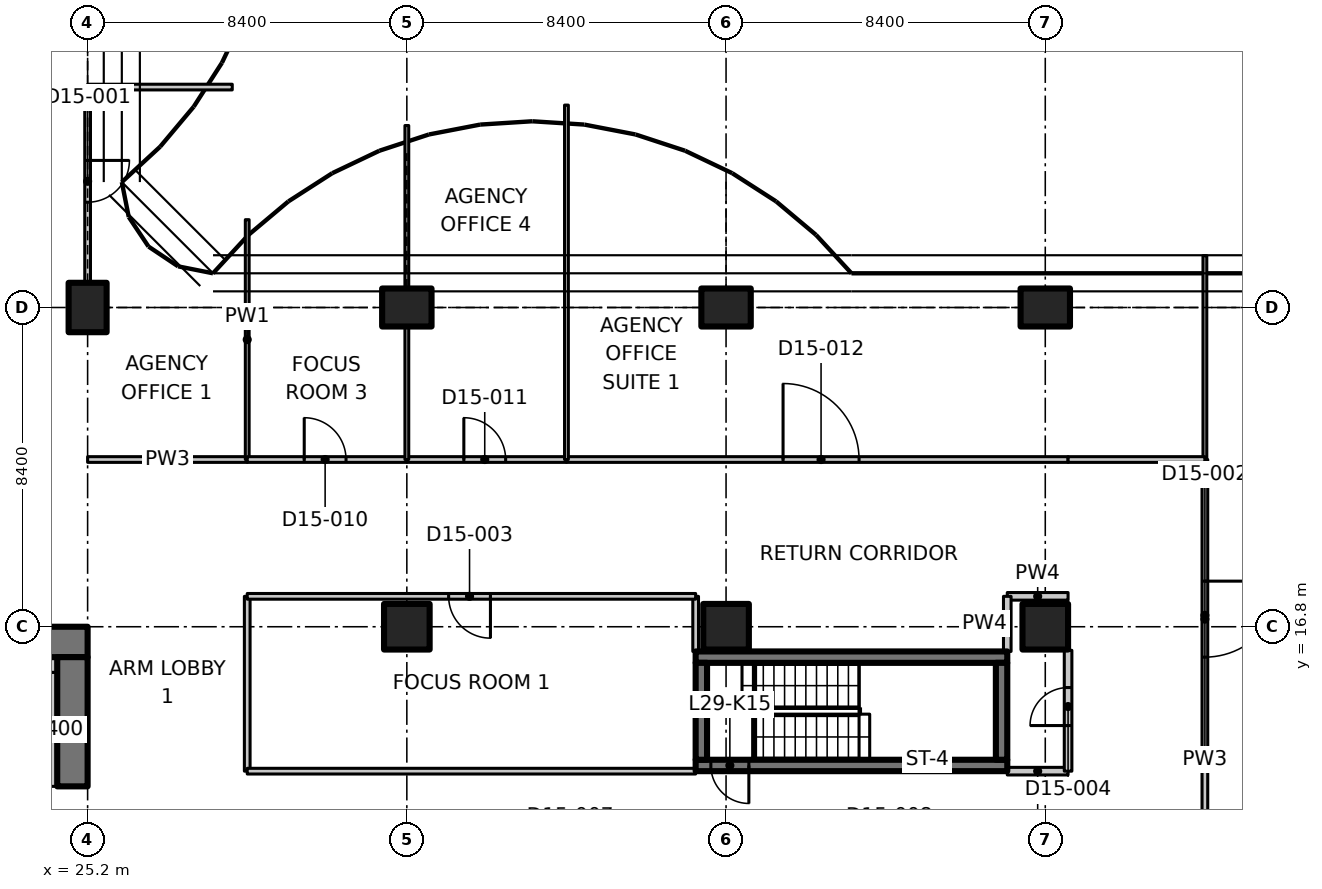
"""IFC4 building model, lengths in metres.
Left out: names, types, materials, properties, quantities, classifications, styles, units other than length and angle.
Written with IfcOpenShell. Run it as: python <this file> out.ifc"""

import sys

from ifc_helpers import new_model, si_unit, direction, frame, frame_2d, origin, origin_2d, place, context, subcontext, project, spatial, polyline, rectangle, outline, extrude, element, fill, save


model = new_model("IFC4")
c1 = context("Model", 3, precision=1e-05, world=origin(), true_north=direction((0.0, 1.0)))
c2 = subcontext(c1, "Body", "Model", "MODEL_VIEW")
j1 = project(units=[si_unit("LENGTHUNIT", "METRE"), si_unit("PLANEANGLEUNIT", "RADIAN")], contexts=[c1])
p1 = place(None, origin())
s1 = spatial("IfcSite", under=j1, at=p1, CompositionType="ELEMENT")
p2 = place(p1, origin())
s2 = spatial("IfcBuilding", under=s1, at=p2, CompositionType="ELEMENT")
p3 = place(p2, frame((0.0, 0.0, 120.5)))
s3 = spatial("IfcBuildingStorey", under=s2, at=p3, CompositionType="ELEMENT", Elevation=120.5)
p4 = place(p3, frame((25.2, 25.2, 0.0), z_axis=(0.0, 0.0, 1.0), x_axis=(1.0, 0.0, 0.0)))
e1 = element("IfcColumn", 1, at=p4, inside=s3, PredefinedType="COLUMN", context=c2, shape_type="SweptSolid", body=[
    extrude(rectangle(XDim=1.0, YDim=1.3, at=origin_2d()), origin(), (0.0, 0.0, 1.0), 3.35),
])
p5 = place(p3, frame((33.6, 16.8, 0.0), z_axis=(0.0, 0.0, 1.0), x_axis=(1.0, 0.0, 0.0)))
e2 = element("IfcColumn", 2, at=p5, inside=s3, PredefinedType="COLUMN", context=c2, shape_type="SweptSolid", body=[
    extrude(rectangle(XDim=1.2, YDim=1.2, at=origin_2d()), origin(), (0.0, 0.0, 1.0), 3.35),
])
p6 = place(p3, frame((33.6, 25.2, 0.0), z_axis=(0.0, 0.0, 1.0), x_axis=(0.0, 1.0, 0.0)))
e3 = element("IfcColumn", 3, at=p6, inside=s3, PredefinedType="COLUMN", context=c2, shape_type="SweptSolid", body=[
    extrude(rectangle(XDim=1.0, YDim=1.3, at=origin_2d()), origin(), (0.0, 0.0, 1.0), 3.35),
])
p7 = place(p3, frame((42.0, 16.8, 0.0), z_axis=(0.0, 0.0, 1.0), x_axis=(1.0, 0.0, 0.0)))
e4 = element("IfcColumn", 4, at=p7, inside=s3, PredefinedType="COLUMN", context=c2, shape_type="SweptSolid", body=[
    extrude(rectangle(XDim=1.2, YDim=1.2, at=origin_2d()), origin(), (0.0, 0.0, 1.0), 3.35),
])
p8 = place(p3, frame((42.0, 25.2, 0.0), z_axis=(0.0, 0.0, 1.0), x_axis=(0.0, 1.0, 0.0)))
e5 = element("IfcColumn", 5, at=p8, inside=s3, PredefinedType="COLUMN", context=c2, shape_type="SweptSolid", body=[
    extrude(rectangle(XDim=1.0, YDim=1.3, at=origin_2d()), origin(), (0.0, 0.0, 1.0), 3.35),
])
p9 = place(p3, frame((50.4, 16.8, 0.0), z_axis=(0.0, 0.0, 1.0), x_axis=(1.0, 0.0, 0.0)))
e6 = element("IfcColumn", 6, at=p9, inside=s3, PredefinedType="COLUMN", context=c2, shape_type="SweptSolid", body=[
    extrude(rectangle(XDim=1.2, YDim=1.2, at=origin_2d()), origin(), (0.0, 0.0, 1.0), 3.35),
])
p10 = place(p3, frame((50.4, 25.2, 0.0), z_axis=(0.0, 0.0, 1.0), x_axis=(0.0, 1.0, 0.0)))
e7 = element("IfcColumn", 7, at=p10, inside=s3, PredefinedType="COLUMN", context=c2, shape_type="SweptSolid", body=[
    extrude(rectangle(XDim=1.0, YDim=1.3, at=origin_2d()), origin(), (0.0, 0.0, 1.0), 3.35),
])
p11 = place(p3, frame((23.8, 16.4, 0.0), z_axis=(0.0, 0.0, 1.0), x_axis=(1.0, 0.0, 0.0)))
e8 = element("IfcWall", 8, at=p11, inside=s3, PredefinedType="SHEAR", context=c2, shape_type="SweptSolid", body=[
    extrude(rectangle(XDim=1.4, YDim=0.8, at=frame_2d((0.7, 0.0))), origin(), (0.0, 0.0, 1.0), 3.35),
])
p12 = place(p3, frame((24.8, 12.6, 0.0), z_axis=(0.0, 0.0, 1.0), x_axis=(0.0, 1.0, 0.0)))
e9 = element("IfcWall", 9, at=p12, inside=s3, PredefinedType="SHEAR", context=c2, shape_type="SweptSolid", body=[
    extrude(rectangle(XDim=3.4, YDim=0.8, at=frame_2d((1.7, 0.0))), origin(), (0.0, 0.0, 1.0), 3.35),
])
p13 = place(p3, frame((24.2, 12.6, 0.0), z_axis=(0.0, 0.0, 1.0), x_axis=(0.0, 1.0, 0.0)))
e10 = element("IfcWall", 10, at=p13, inside=s3, PredefinedType="PARTITIONING", context=c2, shape_type="SweptSolid", body=[
    extrude(rectangle(XDim=3.0, YDim=0.4, at=frame_2d((1.5, 0.0))), origin(), (0.0, 0.0, 1.0), 3.35),
])
p14 = place(p3, frame((23.8, 15.8, 0.0), z_axis=(0.0, 0.0, 1.0), x_axis=(1.0, 0.0, 0.0)))
e11 = element("IfcWall", 11, at=p14, inside=s3, PredefinedType="PARTITIONING", context=c2, shape_type="SweptSolid", body=[
    extrude(rectangle(XDim=0.6, YDim=0.4, at=frame_2d((0.3, 0.0))), origin(), (0.0, 0.0, 1.0), 3.35),
])
p15 = place(p3, frame((49.4, 13.15, 0.0), z_axis=(0.0, 0.0, 1.0), x_axis=(-1.0, 0.0, 0.0)))
e12 = element("IfcWall", 12, at=p15, inside=s3, PredefinedType="SHEAR", context=c2, shape_type="SweptSolid", body=[
    extrude(rectangle(XDim=8.2, YDim=0.3, at=frame_2d((4.1, 0.0))), origin(), (0.0, 0.0, 1.0), 3.35),
])
p16 = place(p15, frame((6.8, 0.0, 0.0)))
e13 = element("IfcOpeningElement", 13, at=p16, cuts=e12, PredefinedType="OPENING", context=c2, shape_type="SweptSolid", body=[
    extrude(rectangle(XDim=1.0, YDim=2.1, at=frame_2d((0.5, 1.05))), frame((0.0, 0.16, 0.0), z_axis=(0.0, -1.0, 0.0), x_axis=(1.0, 0.0, 0.0)), (0.0, 0.0, 1.0), 0.32),
])
p17 = place(p3, frame((41.2, 16.0, 0.0), z_axis=(0.0, 0.0, 1.0), x_axis=(1.0, 0.0, 0.0)))
e14 = element("IfcWall", 14, at=p17, inside=s3, PredefinedType="SHEAR", context=c2, shape_type="SweptSolid", body=[
    extrude(rectangle(XDim=8.2, YDim=0.3, at=frame_2d((4.1, 0.0))), origin(), (0.0, 0.0, 1.0), 3.35),
])
for number, where, z_axis, x_axis in (
    (15, (41.35, 13.3, 0.0), (0.0, 0.0, 1.0), (0.0, 1.0, 0.0)),
    (16, (49.25, 13.3, 0.0), (0.0, 0.0, 1.0), (0.0, 1.0, 0.0)),
):
    element("IfcWall", number, at=place(p3, frame(where, z_axis=z_axis, x_axis=x_axis)), inside=s3, PredefinedType="SHEAR", context=c2, shape_type="SweptSolid", body=[
        extrude(rectangle(XDim=2.55, YDim=0.3, at=frame_2d((1.275, 0.0))), origin(), (0.0, 0.0, 1.0), 3.35),
    ])
p18 = place(p3, frame((25.2, 21.2, 0.0), z_axis=(0.0, 0.0, 1.0), x_axis=(1.0, 0.0, 0.0)))
e17 = element("IfcWall", 17, at=p18, inside=s3, PredefinedType="PARTITIONING", context=c2, shape_type="SweptSolid", body=[
    extrude(rectangle(XDim=4.2, YDim=0.15, at=frame_2d((2.1, 0.0))), origin(), (0.0, 0.0, 1.0), 3.33),
])
p19 = place(p3, frame((29.4, 17.6, 0.0), z_axis=(0.0, 0.0, 1.0), x_axis=(0.0, -1.0, 0.0)))
e18 = element("IfcWall", 18, at=p19, inside=s3, PredefinedType="PARTITIONING", context=c2, shape_type="SweptSolid", body=[
    extrude(rectangle(XDim=4.6, YDim=0.15, at=frame_2d((2.3, 0.0))), origin(), (0.0, 0.0, 1.0), 3.33),
])
p20 = place(p3, frame((29.4, 27.511, 0.0), z_axis=(0.0, 0.0, 1.0), x_axis=(0.0, -1.0, 0.0)))
e19 = element("IfcWall", 19, at=p20, inside=s3, PredefinedType="PARTITIONING", context=c2, shape_type="SweptSolid", body=[
    extrude(outline(polyline([(0.0, 0.0), (6.311, 0.0), (6.311, 3.33), (2.761, 3.33), (2.759, 2.98), (1.863, 2.98), (1.861, 3.33), (0.236, 3.33), (0.0, 3.33), (0.0, 0.0)])), frame((0.0, 0.05, 0.0), z_axis=(0.0, -1.0, 0.0), x_axis=(1.0, 0.0, 0.0)), (0.0, 0.0, 1.0), 0.1),
])
p21 = place(p3, frame((25.2, 31.0, 0.0), z_axis=(0.0, 0.0, 1.0), x_axis=(0.0, -1.0, 0.0)))
e20 = element("IfcWall", 20, at=p21, inside=s3, PredefinedType="PARTITIONING", context=c2, shape_type="SweptSolid", body=[
    extrude(outline(polyline([(0.0, 0.0), (5.13, 0.0), (5.13, 2.98), (0.0, 2.98), (0.0, 0.0)])), frame((0.0, 0.075, 0.0), z_axis=(0.0, -1.0, 0.0), x_axis=(1.0, 0.0, 0.0)), (0.0, 0.0, 1.0), 0.15),
])
p22 = place(p21, frame((1.93, 0.0, 0.0)))
e21 = element("IfcOpeningElement", 21, at=p22, cuts=e20, PredefinedType="OPENING", context=c2, shape_type="SweptSolid", body=[
    extrude(rectangle(XDim=1.1, YDim=2.1, at=frame_2d((0.55, 1.05))), frame((0.0, 0.085, 0.0), z_axis=(0.0, -1.0, 0.0), x_axis=(1.0, 0.0, 0.0)), (0.0, 0.0, 1.0), 0.17),
])
p23 = place(p3, frame((25.2, 31.0, 0.0), z_axis=(0.0, 0.0, 1.0), x_axis=(1.0, 0.0, 0.0)))
e22 = element("IfcWall", 22, at=p23, inside=s3, PredefinedType="PARTITIONING", context=c2, shape_type="SweptSolid", body=[
    extrude(rectangle(XDim=3.806, YDim=0.15, at=frame_2d((1.903, 0.0))), origin(), (0.0, 0.0, 1.0), 2.98),
])
p24 = place(p3, frame((54.6, 13.0, 0.0), z_axis=(0.0, 0.0, 1.0), x_axis=(0.0, -1.0, 0.0)))
e23 = element("IfcWall", 23, at=p24, inside=s3, PredefinedType="PARTITIONING", context=c2, shape_type="SweptSolid", body=[
    extrude(rectangle(XDim=3.4, YDim=0.15, at=frame_2d((1.7, 0.0))), origin(), (0.0, 0.0, 1.0), 3.33),
])
p25 = place(p3, frame((29.4, 13.0, 0.0), z_axis=(0.0, 0.0, 1.0), x_axis=(1.0, 0.0, 0.0)))
e24 = element("IfcWall", 24, at=p25, inside=s3, PredefinedType="PARTITIONING", context=c2, shape_type="SweptSolid", body=[
    extrude(rectangle(XDim=11.8, YDim=0.15, at=frame_2d((5.9, 0.0))), origin(), (0.0, 0.0, 1.0), 3.33),
])
p26 = place(p3, frame((49.4, 13.0, 0.0), z_axis=(0.0, 0.0, 1.0), x_axis=(1.0, 0.0, 0.0)))
e25 = element("IfcWall", 25, at=p26, inside=s3, PredefinedType="PARTITIONING", context=c2, shape_type="SweptSolid", body=[
    extrude(rectangle(XDim=1.6, YDim=0.2, at=frame_2d((0.8, 0.0))), origin(), (0.0, 0.0, 1.0), 3.33),
])
p27 = place(p3, frame((54.6, 21.2, 0.0), z_axis=(0.0, 0.0, 1.0), x_axis=(0.0, -1.0, 0.0)))
e26 = element("IfcWall", 26, at=p27, inside=s3, PredefinedType="PARTITIONING", context=c2, shape_type="SweptSolid", body=[
    extrude(rectangle(XDim=8.2, YDim=0.15, at=frame_2d((4.1, 0.0))), origin(), (0.0, 0.0, 1.0), 3.33),
])
p28 = place(p27, frame((3.2, 0.0, 0.0)))
e27 = element("IfcOpeningElement", 27, at=p28, cuts=e26, PredefinedType="OPENING", context=c2, shape_type="SweptSolid", body=[
    extrude(rectangle(XDim=2.0, YDim=2.4, at=frame_2d((1.0, 1.2))), frame((0.0, 0.085, 0.0), z_axis=(0.0, -1.0, 0.0), x_axis=(1.0, 0.0, 0.0)), (0.0, 0.0, 1.0), 0.17),
])
p29 = place(p3, frame((54.6, 21.2, 0.0), z_axis=(0.0, 0.0, 1.0), x_axis=(0.0, 1.0, 0.0)))
e28 = element("IfcWall", 28, at=p29, inside=s3, PredefinedType="PARTITIONING", context=c2, shape_type="SweptSolid", body=[
    extrude(outline(polyline([(0.0, 0.0), (5.365, 0.0), (5.365, 3.33), (5.1, 3.33), (4.45, 3.33), (4.448, 2.98), (3.552, 2.98), (3.55, 3.33), (0.0, 3.33), (0.0, 0.0)])), frame((0.0, 0.05, 0.0), z_axis=(0.0, -1.0, 0.0), x_axis=(1.0, 0.0, 0.0)), (0.0, 0.0, 1.0), 0.1),
])
p30 = place(p3, frame((41.2, 16.15, 0.0), z_axis=(0.0, 0.0, 1.0), x_axis=(0.0, 1.0, 0.0)))
e29 = element("IfcWall", 29, at=p30, inside=s3, PredefinedType="PARTITIONING", context=c2, shape_type="SweptSolid", body=[
    extrude(rectangle(XDim=1.45, YDim=0.15, at=frame_2d((0.725, 0.0))), origin(), (0.0, 0.0, 1.0), 3.33),
])
p31 = place(p3, frame((41.2, 17.6, 0.0), z_axis=(0.0, 0.0, 1.0), x_axis=(-1.0, 0.0, 0.0)))
e30 = element("IfcWall", 30, at=p31, inside=s3, PredefinedType="PARTITIONING", context=c2, shape_type="SweptSolid", body=[
    extrude(rectangle(XDim=11.8, YDim=0.15, at=frame_2d((5.9, 0.0))), origin(), (0.0, 0.0, 1.0), 3.33),
])
p32 = place(p31, frame((5.4, 0.0, 0.0)))
e31 = element("IfcOpeningElement", 31, at=p32, cuts=e30, PredefinedType="OPENING", context=c2, shape_type="SweptSolid", body=[
    extrude(rectangle(XDim=1.1, YDim=2.1, at=frame_2d((0.55, 1.05))), frame((0.0, 0.085, 0.0), z_axis=(0.0, -1.0, 0.0), x_axis=(1.0, 0.0, 0.0)), (0.0, 0.0, 1.0), 0.17),
])
p33 = place(p3, frame((51.0, 17.6, 0.0), z_axis=(0.0, 0.0, 1.0), x_axis=(-1.0, 0.0, 0.0)))
e32 = element("IfcWall", 32, at=p33, inside=s3, PredefinedType="PARTITIONING", context=c2, shape_type="SweptSolid", body=[
    extrude(rectangle(XDim=1.6, YDim=0.2, at=frame_2d((0.8, 0.0))), origin(), (0.0, 0.0, 1.0), 3.33),
])
p34 = place(p3, frame((49.4, 17.6, 0.0), z_axis=(0.0, 0.0, 1.0), x_axis=(0.0, -1.0, 0.0)))
e33 = element("IfcWall", 33, at=p34, inside=s3, PredefinedType="PARTITIONING", context=c2, shape_type="SweptSolid", body=[
    extrude(rectangle(XDim=1.45, YDim=0.2, at=frame_2d((0.725, 0.0))), origin(), (0.0, 0.0, 1.0), 3.33),
])
p35 = place(p3, frame((29.4, 21.2, 0.0), z_axis=(0.0, 0.0, 1.0), x_axis=(1.0, 0.0, 0.0)))
e34 = element("IfcWall", 34, at=p35, inside=s3, PredefinedType="PARTITIONING", context=c2, shape_type="SweptSolid", body=[
    extrude(rectangle(XDim=4.2, YDim=0.15, at=frame_2d((2.1, 0.0))), origin(), (0.0, 0.0, 1.0), 3.33),
])
p36 = place(p35, frame((1.5, 0.0, 0.0)))
e35 = element("IfcOpeningElement", 35, at=p36, cuts=e34, PredefinedType="OPENING", context=c2, shape_type="SweptSolid", body=[
    extrude(rectangle(XDim=1.1, YDim=2.1, at=frame_2d((0.55, 1.05))), frame((0.0, 0.085, 0.0), z_axis=(0.0, -1.0, 0.0), x_axis=(1.0, 0.0, 0.0)), (0.0, 0.0, 1.0), 0.17),
])
p37 = place(p3, frame((33.6, 21.2, 0.0), z_axis=(0.0, 0.0, 1.0), x_axis=(1.0, 0.0, 0.0)))
e36 = element("IfcWall", 36, at=p37, inside=s3, PredefinedType="PARTITIONING", context=c2, shape_type="SweptSolid", body=[
    extrude(rectangle(XDim=4.2, YDim=0.15, at=frame_2d((2.1, 0.0))), origin(), (0.0, 0.0, 1.0), 3.33),
])
p38 = place(p37, frame((1.5, 0.0, 0.0)))
e37 = element("IfcOpeningElement", 37, at=p38, cuts=e36, PredefinedType="OPENING", context=c2, shape_type="SweptSolid", body=[
    extrude(rectangle(XDim=1.1, YDim=2.1, at=frame_2d((0.55, 1.05))), frame((0.0, 0.085, 0.0), z_axis=(0.0, -1.0, 0.0), x_axis=(1.0, 0.0, 0.0)), (0.0, 0.0, 1.0), 0.17),
])
p39 = place(p3, frame((37.8, 21.2, 0.0), z_axis=(0.0, 0.0, 1.0), x_axis=(1.0, 0.0, 0.0)))
e38 = element("IfcWall", 38, at=p39, inside=s3, PredefinedType="PARTITIONING", context=c2, shape_type="SweptSolid", body=[
    extrude(rectangle(XDim=13.2, YDim=0.15, at=frame_2d((6.6, 0.0))), origin(), (0.0, 0.0, 1.0), 3.33),
])
p40 = place(p39, frame((5.7, 0.0, 0.0)))
e39 = element("IfcOpeningElement", 39, at=p40, cuts=e38, PredefinedType="OPENING", context=c2, shape_type="SweptSolid", body=[
    extrude(rectangle(XDim=2.0, YDim=2.4, at=frame_2d((1.0, 1.2))), frame((0.0, 0.085, 0.0), z_axis=(0.0, -1.0, 0.0), x_axis=(1.0, 0.0, 0.0)), (0.0, 0.0, 1.0), 0.17),
])
p41 = place(p3, frame((51.0, 13.0, 0.0), z_axis=(0.0, 0.0, 1.0), x_axis=(0.0, 1.0, 0.0)))
e40 = element("IfcWall", 40, at=p41, inside=s3, PredefinedType="PARTITIONING", context=c2, shape_type="SweptSolid", body=[
    extrude(rectangle(XDim=3.18, YDim=0.2, at=frame_2d((1.59, 0.0))), origin(), (0.0, 0.0, 1.0), 3.33),
])
p42 = place(p41, frame((1.2, 0.0, 0.0)))
e41 = element("IfcOpeningElement", 41, at=p42, cuts=e40, PredefinedType="OPENING", context=c2, shape_type="SweptSolid", body=[
    extrude(rectangle(XDim=1.0, YDim=2.1, at=frame_2d((0.5, 1.05))), frame((0.0, 0.11, 0.0), z_axis=(0.0, -1.0, 0.0), x_axis=(1.0, 0.0, 0.0)), (0.0, 0.0, 1.0), 0.22),
])
p43 = place(p3, frame((51.0, 21.2, 0.0), z_axis=(0.0, 0.0, 1.0), x_axis=(1.0, 0.0, 0.0)))
e42 = element("IfcWall", 42, at=p43, inside=s3, PredefinedType="PARTITIONING", context=c2, shape_type="SweptSolid", body=[
    extrude(rectangle(XDim=3.6, YDim=0.15, at=frame_2d((1.8, 0.0))), origin(), (0.0, 0.0, 1.0), 3.33),
])
p44 = place(p3, frame((33.6, 29.988, 0.0), z_axis=(0.0, 0.0, 1.0), x_axis=(0.0, -1.0, 0.0)))
e43 = element("IfcWall", 43, at=p44, inside=s3, PredefinedType="PARTITIONING", context=c2, shape_type="SweptSolid", body=[
    extrude(rectangle(XDim=4.268, YDim=0.1, at=frame_2d((2.134, 0.0))), origin(), (0.0, 0.0, 1.0), 2.98),
])
p45 = place(p3, frame((33.6, 24.68, 0.0), z_axis=(0.0, 0.0, 1.0), x_axis=(0.0, -1.0, 0.0)))
e44 = element("IfcWall", 44, at=p45, inside=s3, PredefinedType="PARTITIONING", context=c2, shape_type="SweptSolid", body=[
    extrude(rectangle(XDim=3.48, YDim=0.1, at=frame_2d((1.74, 0.0))), origin(), (0.0, 0.0, 1.0), 3.33),
])
p46 = place(p3, frame((37.8, 30.526, 0.0), z_axis=(0.0, 0.0, 1.0), x_axis=(0.0, -1.0, 0.0)))
e45 = element("IfcWall", 45, at=p46, inside=s3, PredefinedType="PARTITIONING", context=c2, shape_type="SweptSolid", body=[
    extrude(outline(polyline([(0.0, 0.0), (9.326, 0.0), (9.326, 3.33), (5.776, 3.33), (5.774, 2.98), (4.878, 2.98), (4.876, 3.33), (0.283, 3.33), (0.0, 3.33), (0.0, 0.0)])), frame((0.0, 0.05, 0.0), z_axis=(0.0, -1.0, 0.0), x_axis=(1.0, 0.0, 0.0)), (0.0, 0.0, 1.0), 0.1),
])
p47 = place(p16, origin())
e46 = element("IfcDoor", 46, at=p47, inside=s3, OperationType="SINGLE_SWING_RIGHT", PredefinedType="DOOR", context=c2, shape_type="SweptSolid", body=[
    extrude(rectangle(XDim=1.0, YDim=2.1, at=frame_2d((0.5, 1.05))), frame((0.0, 0.025, 0.0), z_axis=(0.0, -1.0, 0.0), x_axis=(1.0, 0.0, 0.0)), (0.0, 0.0, 1.0), 0.05),
])
fill(e13, e46)
p48 = place(p22, origin())
e47 = element("IfcDoor", 47, at=p48, inside=s3, OperationType="SINGLE_SWING_RIGHT", PredefinedType="DOOR", context=c2, shape_type="SweptSolid", body=[
    extrude(rectangle(XDim=1.1, YDim=2.1, at=frame_2d((0.55, 1.05))), frame((0.0, 0.025, 0.0), z_axis=(0.0, -1.0, 0.0), x_axis=(1.0, 0.0, 0.0)), (0.0, 0.0, 1.0), 0.05),
])
fill(e21, e47)
p49 = place(p28, origin())
e48 = element("IfcDoor", 48, at=p49, inside=s3, OperationType="DOUBLE_DOOR_SINGLE_SWING", PredefinedType="DOOR", context=c2, shape_type="SweptSolid", body=[
    extrude(rectangle(XDim=2.0, YDim=2.4, at=frame_2d((1.0, 1.2))), frame((0.0, 0.025, 0.0), z_axis=(0.0, -1.0, 0.0), x_axis=(1.0, 0.0, 0.0)), (0.0, 0.0, 1.0), 0.05),
])
fill(e27, e48)
p50 = place(p32, origin())
e49 = element("IfcDoor", 49, at=p50, inside=s3, OperationType="SINGLE_SWING_LEFT", PredefinedType="DOOR", context=c2, shape_type="SweptSolid", body=[
    extrude(rectangle(XDim=1.1, YDim=2.1, at=frame_2d((0.55, 1.05))), frame((0.0, 0.025, 0.0), z_axis=(0.0, -1.0, 0.0), x_axis=(1.0, 0.0, 0.0)), (0.0, 0.0, 1.0), 0.05),
])
fill(e31, e49)
p51 = place(p42, origin())
e50 = element("IfcDoor", 50, at=p51, inside=s3, OperationType="SINGLE_SWING_LEFT", PredefinedType="DOOR", context=c2, shape_type="SweptSolid", body=[
    extrude(rectangle(XDim=1.0, YDim=2.1, at=frame_2d((0.5, 1.05))), frame((0.0, 0.025, 0.0), z_axis=(0.0, -1.0, 0.0), x_axis=(1.0, 0.0, 0.0)), (0.0, 0.0, 1.0), 0.05),
])
fill(e41, e50)
p52 = place(p36, origin())
e51 = element("IfcDoor", 51, at=p52, inside=s3, OperationType="SINGLE_SWING_LEFT", PredefinedType="DOOR", context=c2, shape_type="SweptSolid", body=[
    extrude(rectangle(XDim=1.1, YDim=2.1, at=frame_2d((0.55, 1.05))), frame((0.0, 0.025, 0.0), z_axis=(0.0, -1.0, 0.0), x_axis=(1.0, 0.0, 0.0)), (0.0, 0.0, 1.0), 0.05),
])
fill(e35, e51)
p53 = place(p38, origin())
e52 = element("IfcDoor", 52, at=p53, inside=s3, OperationType="SINGLE_SWING_LEFT", PredefinedType="DOOR", context=c2, shape_type="SweptSolid", body=[
    extrude(rectangle(XDim=1.1, YDim=2.1, at=frame_2d((0.55, 1.05))), frame((0.0, 0.025, 0.0), z_axis=(0.0, -1.0, 0.0), x_axis=(1.0, 0.0, 0.0)), (0.0, 0.0, 1.0), 0.05),
])
fill(e37, e52)
p54 = place(p40, origin())
e53 = element("IfcDoor", 53, at=p54, inside=s3, OperationType="DOUBLE_DOOR_SINGLE_SWING", PredefinedType="DOOR", context=c2, shape_type="SweptSolid", body=[
    extrude(rectangle(XDim=2.0, YDim=2.4, at=frame_2d((1.0, 1.2))), frame((0.0, 0.025, 0.0), z_axis=(0.0, -1.0, 0.0), x_axis=(1.0, 0.0, 0.0)), (0.0, 0.0, 1.0), 0.05),
])
fill(e39, e53)
save(model, sys.argv[1])
